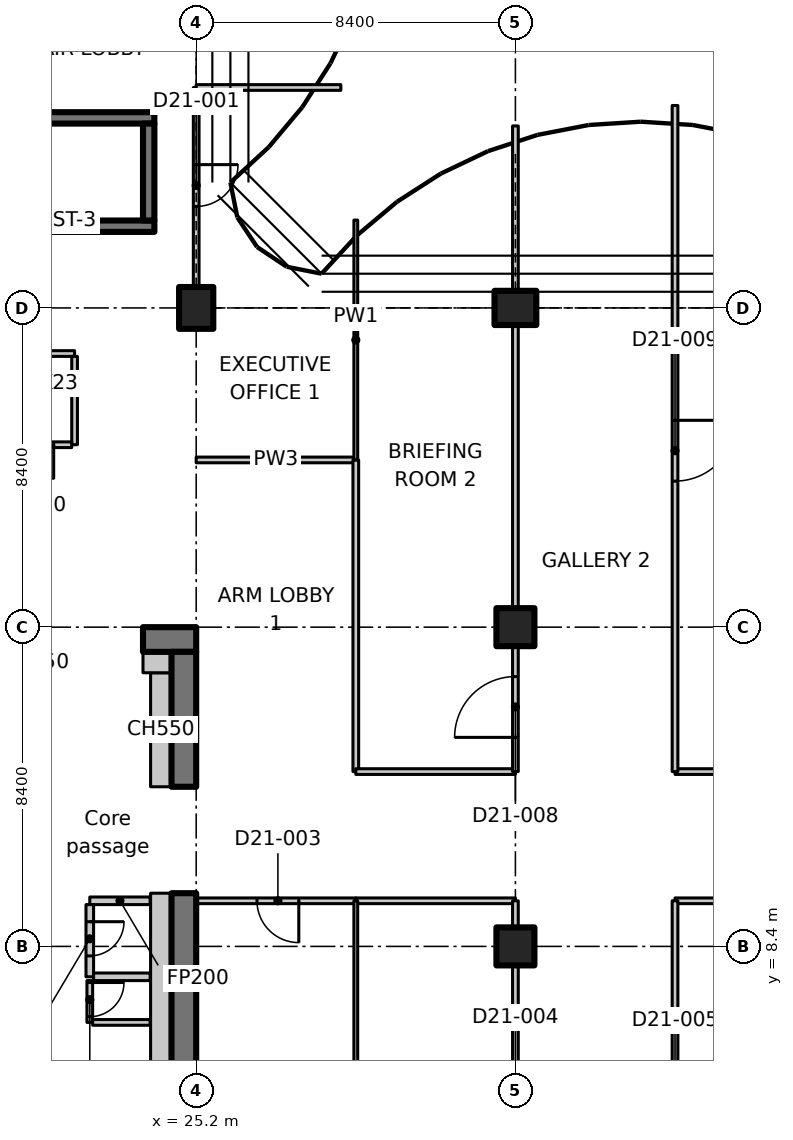
"""IFC4 building model, lengths in metres.
Left out: names, types, materials, properties, quantities, classifications, styles, units other than length and angle.
Written with IfcOpenShell. Run it as: python <this file> out.ifc"""

import sys

from ifc_helpers import new_model, si_unit, direction, frame, frame_2d, origin, origin_2d, place, context, subcontext, project, spatial, polyline, rectangle, outline, extrude, element, fill, save


model = new_model("IFC4")
c1 = context("Model", 3, precision=1e-05, world=origin(), true_north=direction((0.0, 1.0)))
c2 = subcontext(c1, "Body", "Model", "MODEL_VIEW")
j1 = project(units=[si_unit("LENGTHUNIT", "METRE"), si_unit("PLANEANGLEUNIT", "RADIAN")], contexts=[c1])
p1 = place(None, origin())
s1 = spatial("IfcSite", under=j1, at=p1, CompositionType="ELEMENT")
p2 = place(p1, origin())
s2 = spatial("IfcBuilding", under=s1, at=p2, CompositionType="ELEMENT")
p3 = place(p2, frame((0.0, 0.0, 174.0)))
s3 = spatial("IfcBuildingStorey", under=s2, at=p3, CompositionType="ELEMENT", Elevation=174.0)
p4 = place(p3, frame((25.2, 25.2, 0.0), z_axis=(0.0, 0.0, 1.0), x_axis=(1.0, 0.0, 0.0)))
e1 = element("IfcColumn", 1, at=p4, inside=s3, PredefinedType="COLUMN", context=c2, shape_type="SweptSolid", body=[
    extrude(rectangle(XDim=0.9, YDim=1.1, at=origin_2d()), origin(), (0.0, 0.0, 1.0), 3.35),
])
for number, where, z_axis, x_axis in (
    (2, (33.6, 8.4, 0.0), (0.0, 0.0, 1.0), (1.0, 0.0, 0.0)),
    (3, (33.6, 16.8, 0.0), (0.0, 0.0, 1.0), (1.0, 0.0, 0.0)),
):
    element("IfcColumn", number, at=place(p3, frame(where, z_axis=z_axis, x_axis=x_axis)), inside=s3, PredefinedType="COLUMN", context=c2, shape_type="SweptSolid", body=[
        extrude(rectangle(XDim=1.0, YDim=1.0, at=origin_2d()), origin(), (0.0, 0.0, 1.0), 3.35),
    ])
p5 = place(p3, frame((33.6, 25.2, 0.0), z_axis=(0.0, 0.0, 1.0), x_axis=(0.0, 1.0, 0.0)))
e4 = element("IfcColumn", 4, at=p5, inside=s3, PredefinedType="COLUMN", context=c2, shape_type="SweptSolid", body=[
    extrude(rectangle(XDim=0.9, YDim=1.1, at=origin_2d()), origin(), (0.0, 0.0, 1.0), 3.35),
])
p6 = place(p3, frame((23.8, 16.475, 0.0), z_axis=(0.0, 0.0, 1.0), x_axis=(1.0, 0.0, 0.0)))
e5 = element("IfcWall", 5, at=p6, inside=s3, PredefinedType="SHEAR", context=c2, shape_type="SweptSolid", body=[
    extrude(rectangle(XDim=1.4, YDim=0.65, at=frame_2d((0.7, 0.0))), origin(), (0.0, 0.0, 1.0), 3.35),
])
p7 = place(p3, frame((24.875, 0.65, 0.0), z_axis=(0.0, 0.0, 1.0), x_axis=(0.0, 1.0, 0.0)))
e6 = element("IfcWall", 6, at=p7, inside=s3, PredefinedType="SHEAR", context=c2, shape_type="SweptSolid", body=[
    extrude(rectangle(XDim=9.15, YDim=0.65, at=frame_2d((4.575, 0.0))), origin(), (0.0, 0.0, 1.0), 3.35),
])
p8 = place(p3, frame((24.875, 12.6, 0.0), z_axis=(0.0, 0.0, 1.0), x_axis=(0.0, 1.0, 0.0)))
e7 = element("IfcWall", 7, at=p8, inside=s3, PredefinedType="SHEAR", context=c2, shape_type="SweptSolid", body=[
    extrude(rectangle(XDim=3.55, YDim=0.65, at=frame_2d((1.775, 0.0))), origin(), (0.0, 0.0, 1.0), 3.35),
])
p9 = place(p3, frame((24.275, 12.6, 0.0), z_axis=(0.0, 0.0, 1.0), x_axis=(0.0, 1.0, 0.0)))
e8 = element("IfcWall", 8, at=p9, inside=s3, PredefinedType="PARTITIONING", context=c2, shape_type="SweptSolid", body=[
    extrude(rectangle(XDim=3.0, YDim=0.55, at=frame_2d((1.5, 0.0))), origin(), (0.0, 0.0, 1.0), 3.35),
])
p10 = place(p3, frame((23.8, 15.875, 0.0), z_axis=(0.0, 0.0, 1.0), x_axis=(1.0, 0.0, 0.0)))
e9 = element("IfcWall", 9, at=p10, inside=s3, PredefinedType="PARTITIONING", context=c2, shape_type="SweptSolid", body=[
    extrude(rectangle(XDim=0.75, YDim=0.55, at=frame_2d((0.375, 0.0))), origin(), (0.0, 0.0, 1.0), 3.35),
])
for number, where, z_axis, x_axis in (
    (10, (15.9, 27.35, 0.0), (0.0, 0.0, 1.0), (1.0, 0.0, 0.0)),
    (11, (15.9, 30.2, 0.0), (0.0, 0.0, 1.0), (1.0, 0.0, 0.0)),
):
    element("IfcWall", number, at=place(p3, frame(where, z_axis=z_axis, x_axis=x_axis)), inside=s3, PredefinedType="SHEAR", context=c2, shape_type="SweptSolid", body=[
        extrude(rectangle(XDim=8.2, YDim=0.3, at=frame_2d((4.1, 0.0))), origin(), (0.0, 0.0, 1.0), 3.35),
    ])
p11 = place(p3, frame((23.95, 27.5, 0.0), z_axis=(0.0, 0.0, 1.0), x_axis=(0.0, 1.0, 0.0)))
e12 = element("IfcWall", 12, at=p11, inside=s3, PredefinedType="SHEAR", context=c2, shape_type="SweptSolid", body=[
    extrude(rectangle(XDim=2.55, YDim=0.3, at=frame_2d((1.275, 0.0))), origin(), (0.0, 0.0, 1.0), 3.35),
])
p12 = place(p3, frame((23.988, 9.6, 0.0), z_axis=(0.0, 0.0, 1.0), x_axis=(-1.0, 0.0, 0.0)))
e13 = element("IfcWall", 13, at=p12, inside=s3, PredefinedType="PARTITIONING", context=c2, shape_type="SweptSolid", body=[
    extrude(rectangle(XDim=1.588, YDim=0.2, at=frame_2d((0.794, 0.0))), origin(), (0.0, 0.0, 1.0), 3.35),
])
p13 = place(p3, frame((22.4, 9.5, 0.0), z_axis=(0.0, 0.0, 1.0), x_axis=(0.0, -1.0, 0.0)))
e14 = element("IfcWall", 14, at=p13, inside=s3, PredefinedType="PARTITIONING", context=c2, shape_type="SweptSolid", body=[
    extrude(rectangle(XDim=1.9, YDim=0.2, at=frame_2d((0.95, 0.0))), origin(), (0.0, 0.0, 1.0), 3.35),
])
p14 = place(p13, frame((0.45, 0.0, 0.0)))
e15 = element("IfcOpeningElement", 15, at=p14, cuts=e14, PredefinedType="OPENING", context=c2, shape_type="SweptSolid", body=[
    extrude(rectangle(XDim=0.9, YDim=2.1, at=frame_2d((0.45, 1.05))), frame((0.0, 0.11, 0.0), z_axis=(0.0, -1.0, 0.0), x_axis=(1.0, 0.0, 0.0)), (0.0, 0.0, 1.0), 0.22),
])
p15 = place(p3, frame((22.5, 7.6, 0.0), z_axis=(0.0, 0.0, 1.0), x_axis=(1.0, 0.0, 0.0)))
e16 = element("IfcWall", 16, at=p15, inside=s3, PredefinedType="PARTITIONING", context=c2, shape_type="SweptSolid", body=[
    extrude(rectangle(XDim=1.488, YDim=0.2, at=frame_2d((0.744, 0.0))), origin(), (0.0, 0.0, 1.0), 3.35),
])
p16 = place(p3, frame((20.0, 24.0, 0.0), z_axis=(0.0, 0.0, 1.0), x_axis=(1.0, 0.0, 0.0)))
e17 = element("IfcWall", 17, at=p16, inside=s3, PredefinedType="PARTITIONING", context=c2, shape_type="SweptSolid", body=[
    extrude(rectangle(XDim=2.0, YDim=0.15, at=frame_2d((1.0, 0.0))), origin(), (0.0, 0.0, 1.0), 3.35),
])
p17 = place(p3, frame((22.0, 23.925, 0.0), z_axis=(0.0, 0.0, 1.0), x_axis=(0.0, -1.0, 0.0)))
e18 = element("IfcWall", 18, at=p17, inside=s3, PredefinedType="PARTITIONING", context=c2, shape_type="SweptSolid", body=[
    extrude(rectangle(XDim=2.325, YDim=0.15, at=frame_2d((1.163, 0.0))), origin(), (0.0, 0.0, 1.0), 3.35),
])
p18 = place(p3, frame((21.925, 21.6, 0.0), z_axis=(0.0, 0.0, 1.0), x_axis=(-1.0, 0.0, 0.0)))
e19 = element("IfcWall", 19, at=p18, inside=s3, PredefinedType="PARTITIONING", context=c2, shape_type="SweptSolid", body=[
    extrude(rectangle(XDim=1.925, YDim=0.15, at=frame_2d((0.962, 0.0))), origin(), (0.0, 0.0, 1.0), 3.35),
])
p19 = place(p18, frame((0.475, 0.0, 0.0)))
e20 = element("IfcOpeningElement", 20, at=p19, cuts=e19, PredefinedType="OPENING", context=c2, shape_type="SweptSolid", body=[
    extrude(rectangle(XDim=0.9, YDim=2.1, at=frame_2d((0.45, 1.05))), frame((0.0, 0.085, 0.0), z_axis=(0.0, -1.0, 0.0), x_axis=(1.0, 0.0, 0.0)), (0.0, 0.0, 1.0), 0.17),
])
p20 = place(p3, frame((22.4, 7.5, 0.0), z_axis=(0.0, 0.0, 1.0), x_axis=(0.0, -1.0, 0.0)))
e21 = element("IfcWall", 21, at=p20, inside=s3, PredefinedType="PARTITIONING", context=c2, shape_type="SweptSolid", body=[
    extrude(rectangle(XDim=1.1, YDim=0.15, at=frame_2d((0.55, 0.0))), origin(), (0.0, 0.0, 1.0), 3.35),
])
p21 = place(p20, frame((0.05, 0.0, 0.0)))
e22 = element("IfcOpeningElement", 22, at=p21, cuts=e21, PredefinedType="OPENING", context=c2, shape_type="SweptSolid", body=[
    extrude(rectangle(XDim=0.9, YDim=2.1, at=frame_2d((0.45, 1.05))), frame((0.0, 0.085, 0.0), z_axis=(0.0, -1.0, 0.0), x_axis=(1.0, 0.0, 0.0)), (0.0, 0.0, 1.0), 0.17),
])
p22 = place(p3, frame((22.475, 6.4, 0.0), z_axis=(0.0, 0.0, 1.0), x_axis=(1.0, 0.0, 0.0)))
e23 = element("IfcWall", 23, at=p22, inside=s3, PredefinedType="PARTITIONING", context=c2, shape_type="SweptSolid", body=[
    extrude(rectangle(XDim=1.513, YDim=0.15, at=frame_2d((0.756, 0.0))), origin(), (0.0, 0.0, 1.0), 3.35),
])
p23 = place(p3, frame((24.275, 4.35, 0.0), z_axis=(0.0, 0.0, 1.0), x_axis=(0.0, 1.0, 0.0)))
e24 = element("IfcWall", 24, at=p23, inside=s3, PredefinedType="PARTITIONING", context=c2, shape_type="SweptSolid", body=[
    extrude(rectangle(XDim=5.45, YDim=0.55, at=frame_2d((2.725, 0.0))), origin(), (0.0, 0.0, 1.0), 3.35),
])
p24 = place(p3, frame((25.2, 21.2, 0.0), z_axis=(0.0, 0.0, 1.0), x_axis=(1.0, 0.0, 0.0)))
e25 = element("IfcWall", 25, at=p24, inside=s3, PredefinedType="PARTITIONING", context=c2, shape_type="SweptSolid", body=[
    extrude(rectangle(XDim=4.2, YDim=0.15, at=frame_2d((2.1, 0.0))), origin(), (0.0, 0.0, 1.0), 3.33),
])
p25 = place(p3, frame((29.4, 9.6, 0.0), z_axis=(0.0, 0.0, 1.0), x_axis=(-1.0, 0.0, 0.0)))
e26 = element("IfcWall", 26, at=p25, inside=s3, PredefinedType="PARTITIONING", context=c2, shape_type="SweptSolid", body=[
    extrude(rectangle(XDim=4.2, YDim=0.15, at=frame_2d((2.1, 0.0))), origin(), (0.0, 0.0, 1.0), 3.33),
])
p26 = place(p25, frame((1.5, 0.0, 0.0)))
e27 = element("IfcOpeningElement", 27, at=p26, cuts=e26, PredefinedType="OPENING", context=c2, shape_type="SweptSolid", body=[
    extrude(rectangle(XDim=1.1, YDim=2.1, at=frame_2d((0.55, 1.05))), frame((0.0, 0.085, 0.0), z_axis=(0.0, -1.0, 0.0), x_axis=(1.0, 0.0, 0.0)), (0.0, 0.0, 1.0), 0.17),
])
p27 = place(p3, frame((29.4, 21.2, 0.0), z_axis=(0.0, 0.0, 1.0), x_axis=(0.0, -1.0, 0.0)))
e28 = element("IfcWall", 28, at=p27, inside=s3, PredefinedType="PARTITIONING", context=c2, shape_type="SweptSolid", body=[
    extrude(rectangle(XDim=8.2, YDim=0.15, at=frame_2d((4.1, 0.0))), origin(), (0.0, 0.0, 1.0), 3.33),
])
p28 = place(p3, frame((29.4, 27.511, 0.0), z_axis=(0.0, 0.0, 1.0), x_axis=(0.0, -1.0, 0.0)))
e29 = element("IfcWall", 29, at=p28, inside=s3, PredefinedType="PARTITIONING", context=c2, shape_type="SweptSolid", body=[
    extrude(outline(polyline([(0.0, 0.0), (6.311, 0.0), (6.311, 3.33), (2.761, 3.33), (2.759, 2.98), (1.863, 2.98), (1.861, 3.33), (0.236, 3.33), (0.0, 3.33), (0.0, 0.0)])), frame((0.0, 0.05, 0.0), z_axis=(0.0, -1.0, 0.0), x_axis=(1.0, 0.0, 0.0)), (0.0, 0.0, 1.0), 0.1),
])
p29 = place(p3, frame((25.2, 31.0, 0.0), z_axis=(0.0, 0.0, 1.0), x_axis=(0.0, -1.0, 0.0)))
e30 = element("IfcWall", 30, at=p29, inside=s3, PredefinedType="PARTITIONING", context=c2, shape_type="SweptSolid", body=[
    extrude(outline(polyline([(0.0, 0.0), (5.23, 0.0), (5.23, 2.98), (0.0, 2.98), (0.0, 0.0)])), frame((0.0, 0.075, 0.0), z_axis=(0.0, -1.0, 0.0), x_axis=(1.0, 0.0, 0.0)), (0.0, 0.0, 1.0), 0.15),
])
p30 = place(p29, frame((2.03, 0.0, 0.0)))
e31 = element("IfcOpeningElement", 31, at=p30, cuts=e30, PredefinedType="OPENING", context=c2, shape_type="SweptSolid", body=[
    extrude(rectangle(XDim=1.1, YDim=2.1, at=frame_2d((0.55, 1.05))), frame((0.0, 0.085, 0.0), z_axis=(0.0, -1.0, 0.0), x_axis=(1.0, 0.0, 0.0)), (0.0, 0.0, 1.0), 0.17),
])
p31 = place(p3, frame((25.2, 31.0, 0.0), z_axis=(0.0, 0.0, 1.0), x_axis=(1.0, 0.0, 0.0)))
e32 = element("IfcWall", 32, at=p31, inside=s3, PredefinedType="PARTITIONING", context=c2, shape_type="SweptSolid", body=[
    extrude(rectangle(XDim=3.806, YDim=0.15, at=frame_2d((1.903, 0.0))), origin(), (0.0, 0.0, 1.0), 2.98),
])
p32 = place(p3, frame((33.6, 9.6, 0.0), z_axis=(0.0, 0.0, 1.0), x_axis=(-1.0, 0.0, 0.0)))
e33 = element("IfcWall", 33, at=p32, inside=s3, PredefinedType="PARTITIONING", context=c2, shape_type="SweptSolid", body=[
    extrude(rectangle(XDim=4.2, YDim=0.15, at=frame_2d((2.1, 0.0))), origin(), (0.0, 0.0, 1.0), 3.33),
])
p33 = place(p3, frame((42.0, 9.6, 0.0), z_axis=(0.0, 0.0, 1.0), x_axis=(-1.0, 0.0, 0.0)))
e34 = element("IfcWall", 34, at=p33, inside=s3, PredefinedType="PARTITIONING", context=c2, shape_type="SweptSolid", body=[
    extrude(rectangle(XDim=4.2, YDim=0.15, at=frame_2d((2.1, 0.0))), origin(), (0.0, 0.0, 1.0), 3.33),
])
p34 = place(p3, frame((29.4, 13.0, 0.0), z_axis=(0.0, 0.0, 1.0), x_axis=(1.0, 0.0, 0.0)))
e35 = element("IfcWall", 35, at=p34, inside=s3, PredefinedType="PARTITIONING", context=c2, shape_type="SweptSolid", body=[
    extrude(rectangle(XDim=4.2, YDim=0.15, at=frame_2d((2.1, 0.0))), origin(), (0.0, 0.0, 1.0), 3.33),
])
p35 = place(p3, frame((37.8, 13.0, 0.0), z_axis=(0.0, 0.0, 1.0), x_axis=(1.0, 0.0, 0.0)))
e36 = element("IfcWall", 36, at=p35, inside=s3, PredefinedType="PARTITIONING", context=c2, shape_type="SweptSolid", body=[
    extrude(rectangle(XDim=3.4, YDim=0.15, at=frame_2d((1.7, 0.0))), origin(), (0.0, 0.0, 1.0), 3.33),
])
p36 = place(p3, frame((33.6, 0.47, 0.0), z_axis=(0.0, 0.0, 1.0), x_axis=(0.0, 1.0, 0.0)))
e37 = element("IfcWall", 37, at=p36, inside=s3, PredefinedType="PARTITIONING", context=c2, shape_type="SweptSolid", body=[
    extrude(rectangle(XDim=7.41, YDim=0.15, at=frame_2d((3.705, 0.0))), origin(), (0.0, 0.0, 1.0), 3.33),
])
p37 = place(p36, frame((3.3, 0.0, 0.0)))
e38 = element("IfcOpeningElement", 38, at=p37, cuts=e37, PredefinedType="OPENING", context=c2, shape_type="SweptSolid", body=[
    extrude(rectangle(XDim=1.1, YDim=2.1, at=frame_2d((0.55, 1.05))), frame((0.0, 0.085, 0.0), z_axis=(0.0, -1.0, 0.0), x_axis=(1.0, 0.0, 0.0)), (0.0, 0.0, 1.0), 0.17),
])
p38 = place(p3, frame((33.6, 8.92, 0.0), z_axis=(0.0, 0.0, 1.0), x_axis=(0.0, 1.0, 0.0)))
e39 = element("IfcWall", 39, at=p38, inside=s3, PredefinedType="PARTITIONING", context=c2, shape_type="SweptSolid", body=[
    extrude(rectangle(XDim=0.68, YDim=0.15, at=frame_2d((0.34, 0.0))), origin(), (0.0, 0.0, 1.0), 3.33),
])
p39 = place(p3, frame((37.8, 9.6, 0.0), z_axis=(0.0, 0.0, 1.0), x_axis=(0.0, -1.0, 0.0)))
e40 = element("IfcWall", 40, at=p39, inside=s3, PredefinedType="PARTITIONING", context=c2, shape_type="SweptSolid", body=[
    extrude(outline(polyline([(0.0, 0.0), (10.774, 0.0), (10.774, 3.33), (10.7, 3.33), (10.05, 3.33), (10.048, 2.98), (9.152, 2.98), (9.15, 3.33), (0.0, 3.33), (0.0, 0.0)])), frame((0.0, 0.075, 0.0), z_axis=(0.0, -1.0, 0.0), x_axis=(1.0, 0.0, 0.0)), (0.0, 0.0, 1.0), 0.15),
])
p40 = place(p39, frame((4.8, 0.0, 0.0)))
e41 = element("IfcOpeningElement", 41, at=p40, cuts=e40, PredefinedType="OPENING", context=c2, shape_type="SweptSolid", body=[
    extrude(rectangle(XDim=1.1, YDim=2.1, at=frame_2d((0.55, 1.05))), frame((0.0, 0.085, 0.0), z_axis=(0.0, -1.0, 0.0), x_axis=(1.0, 0.0, 0.0)), (0.0, 0.0, 1.0), 0.17),
])
p41 = place(p3, frame((29.4, 9.6, 0.0), z_axis=(0.0, 0.0, 1.0), x_axis=(0.0, -1.0, 0.0)))
e42 = element("IfcWall", 42, at=p41, inside=s3, PredefinedType="PARTITIONING", context=c2, shape_type="SweptSolid", body=[
    extrude(outline(polyline([(0.0, 0.0), (10.774, 0.0), (10.774, 3.33), (10.7, 3.33), (10.05, 3.33), (10.048, 2.98), (9.152, 2.98), (9.15, 3.33), (0.0, 3.33), (0.0, 0.0)])), frame((0.0, 0.05, 0.0), z_axis=(0.0, -1.0, 0.0), x_axis=(1.0, 0.0, 0.0)), (0.0, 0.0, 1.0), 0.1),
])
p42 = place(p3, frame((33.6, 13.0, 0.0), z_axis=(0.0, 0.0, 1.0), x_axis=(0.0, 1.0, 0.0)))
e43 = element("IfcWall", 43, at=p42, inside=s3, PredefinedType="PARTITIONING", context=c2, shape_type="SweptSolid", body=[
    extrude(rectangle(XDim=3.28, YDim=0.15, at=frame_2d((1.64, 0.0))), origin(), (0.0, 0.0, 1.0), 3.33),
])
p43 = place(p42, frame((0.9, 0.0, 0.0)))
e44 = element("IfcOpeningElement", 44, at=p43, cuts=e43, PredefinedType="OPENING", context=c2, shape_type="SweptSolid", body=[
    extrude(rectangle(XDim=1.6, YDim=2.1, at=frame_2d((0.8, 1.05))), frame((0.0, 0.085, 0.0), z_axis=(0.0, -1.0, 0.0), x_axis=(1.0, 0.0, 0.0)), (0.0, 0.0, 1.0), 0.17),
])
p44 = place(p3, frame((33.6, 17.32, 0.0), z_axis=(0.0, 0.0, 1.0), x_axis=(0.0, 1.0, 0.0)))
e45 = element("IfcWall", 45, at=p44, inside=s3, PredefinedType="PARTITIONING", context=c2, shape_type="SweptSolid", body=[
    extrude(rectangle(XDim=7.41, YDim=0.15, at=frame_2d((3.705, 0.0))), origin(), (0.0, 0.0, 1.0), 3.33),
])
p45 = place(p3, frame((33.6, 25.67, 0.0), z_axis=(0.0, 0.0, 1.0), x_axis=(0.0, 1.0, 0.0)))
e46 = element("IfcWall", 46, at=p45, inside=s3, PredefinedType="PARTITIONING", context=c2, shape_type="SweptSolid", body=[
    extrude(rectangle(XDim=4.318, YDim=0.15, at=frame_2d((2.159, 0.0))), origin(), (0.0, 0.0, 1.0), 2.98),
])
p46 = place(p3, frame((37.8, 30.526, 0.0), z_axis=(0.0, 0.0, 1.0), x_axis=(0.0, -1.0, 0.0)))
e47 = element("IfcWall", 47, at=p46, inside=s3, PredefinedType="PARTITIONING", context=c2, shape_type="SweptSolid", body=[
    extrude(outline(polyline([(0.0, 0.0), (17.526, 0.0), (17.526, 3.33), (5.776, 3.33), (5.774, 2.98), (4.878, 2.98), (4.876, 3.33), (0.283, 3.33), (0.0, 3.33), (0.0, 0.0)])), frame((0.0, 0.075, 0.0), z_axis=(0.0, -1.0, 0.0), x_axis=(1.0, 0.0, 0.0)), (0.0, 0.0, 1.0), 0.15),
])
p47 = place(p46, frame((8.283, 0.0, 0.0)))
e48 = element("IfcOpeningElement", 48, at=p47, cuts=e47, PredefinedType="OPENING", context=c2, shape_type="SweptSolid", body=[
    extrude(rectangle(XDim=1.6, YDim=2.1, at=frame_2d((0.8, 1.05))), frame((0.0, 0.085, 0.0), z_axis=(0.0, -1.0, 0.0), x_axis=(1.0, 0.0, 0.0)), (0.0, 0.0, 1.0), 0.17),
])
p48 = place(p21, origin())
e49 = element("IfcDoor", 49, at=p48, inside=s3, OperationType="SINGLE_SWING_LEFT", PredefinedType="DOOR", context=c2, shape_type="SweptSolid", body=[
    extrude(rectangle(XDim=0.9, YDim=2.1, at=frame_2d((0.45, 1.05))), frame((0.0, 0.025, 0.0), z_axis=(0.0, -1.0, 0.0), x_axis=(1.0, 0.0, 0.0)), (0.0, 0.0, 1.0), 0.05),
])
fill(e22, e49)
p49 = place(p14, origin())
e50 = element("IfcDoor", 50, at=p49, inside=s3, OperationType="SINGLE_SWING_RIGHT", PredefinedType="DOOR", context=c2, shape_type="SweptSolid", body=[
    extrude(rectangle(XDim=0.9, YDim=2.1, at=frame_2d((0.45, 1.05))), frame((0.0, 0.025, 0.0), z_axis=(0.0, -1.0, 0.0), x_axis=(1.0, 0.0, 0.0)), (0.0, 0.0, 1.0), 0.05),
])
fill(e15, e50)
p50 = place(p19, origin())
e51 = element("IfcDoor", 51, at=p50, inside=s3, OperationType="SINGLE_SWING_LEFT", PredefinedType="DOOR", context=c2, shape_type="SweptSolid", body=[
    extrude(rectangle(XDim=0.9, YDim=2.1, at=frame_2d((0.45, 1.05))), frame((0.0, 0.025, 0.0), z_axis=(0.0, -1.0, 0.0), x_axis=(1.0, 0.0, 0.0)), (0.0, 0.0, 1.0), 0.05),
])
fill(e20, e51)
p51 = place(p30, origin())
e52 = element("IfcDoor", 52, at=p51, inside=s3, OperationType="SINGLE_SWING_RIGHT", PredefinedType="DOOR", context=c2, shape_type="SweptSolid", body=[
    extrude(rectangle(XDim=1.1, YDim=2.1, at=frame_2d((0.55, 1.05))), frame((0.0, 0.025, 0.0), z_axis=(0.0, -1.0, 0.0), x_axis=(1.0, 0.0, 0.0)), (0.0, 0.0, 1.0), 0.05),
])
fill(e31, e52)
p52 = place(p26, origin())
e53 = element("IfcDoor", 53, at=p52, inside=s3, OperationType="SINGLE_SWING_LEFT", PredefinedType="DOOR", context=c2, shape_type="SweptSolid", body=[
    extrude(rectangle(XDim=1.1, YDim=2.1, at=frame_2d((0.55, 1.05))), frame((0.0, 0.025, 0.0), z_axis=(0.0, -1.0, 0.0), x_axis=(1.0, 0.0, 0.0)), (0.0, 0.0, 1.0), 0.05),
])
fill(e27, e53)
p53 = place(p43, origin())
e54 = element("IfcDoor", 54, at=p53, inside=s3, OperationType="DOUBLE_DOOR_SINGLE_SWING", PredefinedType="DOOR", context=c2, shape_type="SweptSolid", body=[
    extrude(rectangle(XDim=1.6, YDim=2.1, at=frame_2d((0.8, 1.05))), frame((0.0, 0.025, 0.0), z_axis=(0.0, -1.0, 0.0), x_axis=(1.0, 0.0, 0.0)), (0.0, 0.0, 1.0), 0.05),
])
fill(e44, e54)
p54 = place(p47, origin())
e55 = element("IfcDoor", 55, at=p54, inside=s3, OperationType="DOUBLE_DOOR_SINGLE_SWING", PredefinedType="DOOR", context=c2, shape_type="SweptSolid", body=[
    extrude(rectangle(XDim=1.6, YDim=2.1, at=frame_2d((0.8, 1.05))), frame((0.0, 0.025, 0.0), z_axis=(0.0, -1.0, 0.0), x_axis=(1.0, 0.0, 0.0)), (0.0, 0.0, 1.0), 0.05),
])
fill(e48, e55)
save(model, sys.argv[1])
